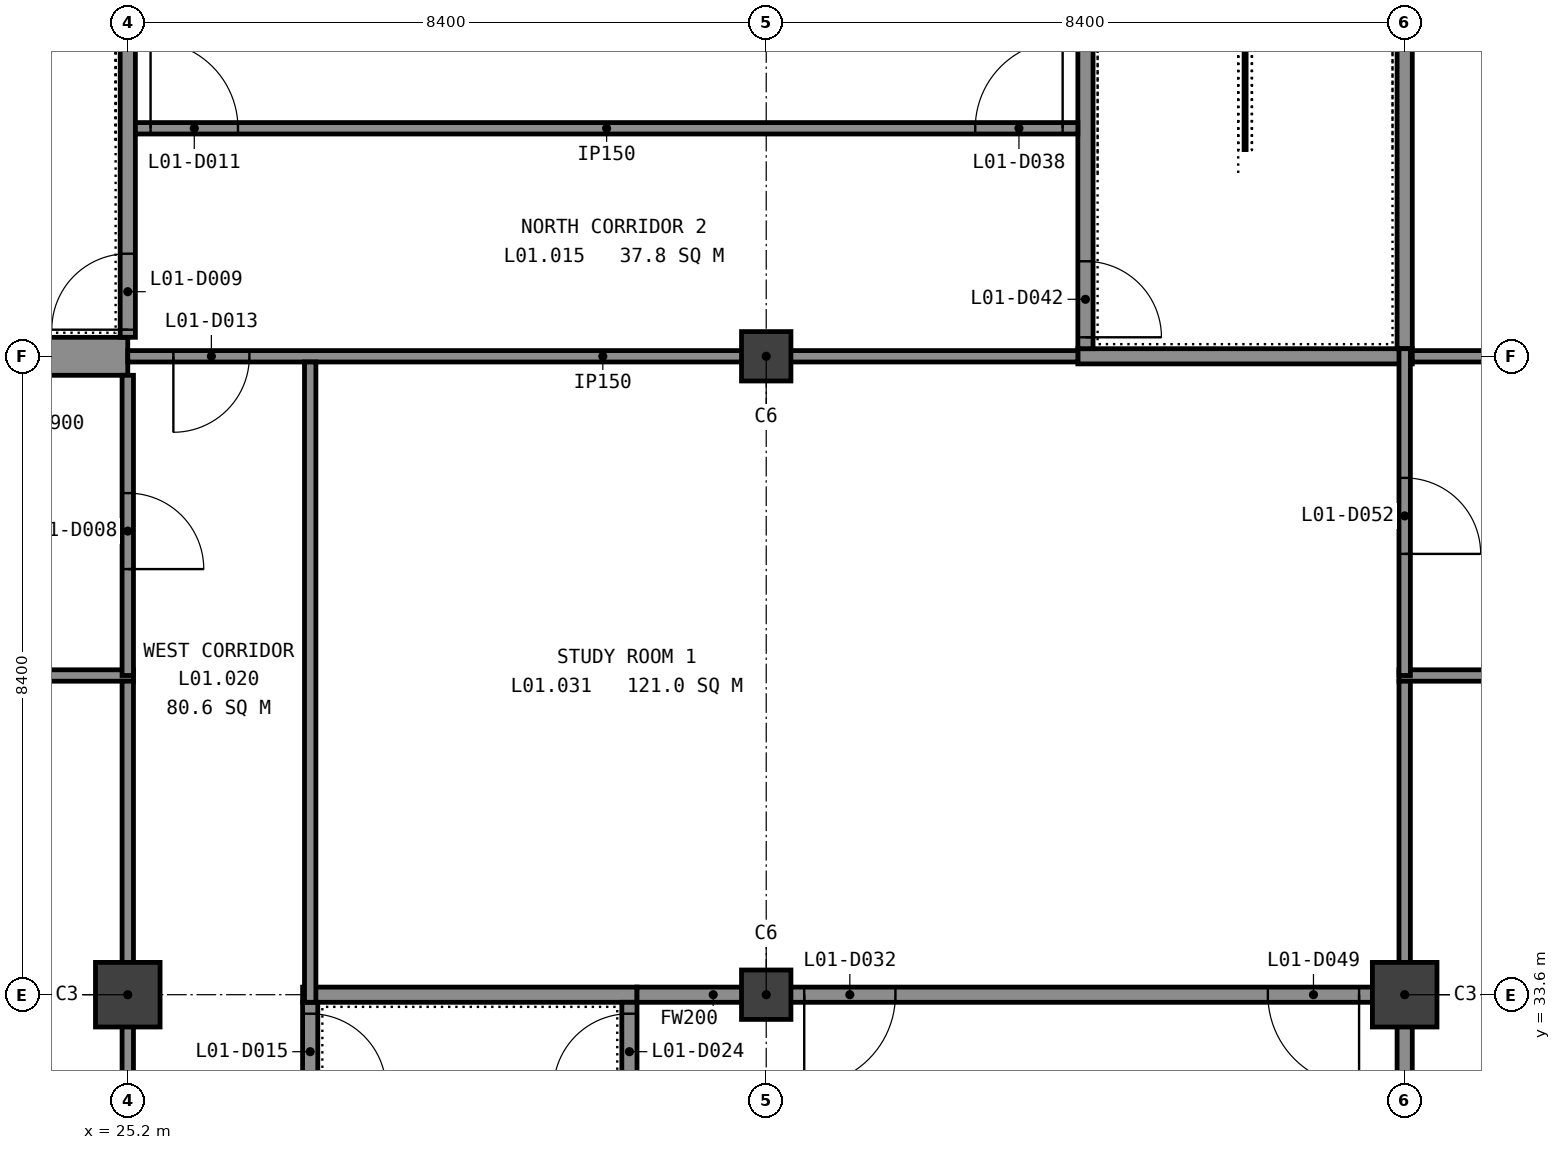
"""IFC4 building model, lengths in metres.
Left out: names, types, materials, properties, quantities, classifications, styles, units other than length and angle.
Written with IfcOpenShell. Run it as: python <this file> out.ifc"""

import sys

from ifc_helpers import new_model, si_unit, direction, frame, frame_2d, origin, origin_2d, place, context, subcontext, project, spatial, rectangle, extrude, element, fill, save


model = new_model("IFC4")
c1 = context("Model", 3, precision=1e-05, world=origin(), true_north=direction((0.0, 1.0)))
c2 = subcontext(c1, "Body", "Model", "MODEL_VIEW")
j1 = project(units=[si_unit("LENGTHUNIT", "METRE"), si_unit("PLANEANGLEUNIT", "RADIAN")], contexts=[c1])
p1 = place(None, origin())
s1 = spatial("IfcSite", under=j1, at=p1, CompositionType="ELEMENT")
p2 = place(p1, origin())
s2 = spatial("IfcBuilding", under=s1, at=p2, CompositionType="ELEMENT")
p3 = place(p2, frame((0.0, 0.0, 5.4)))
s3 = spatial("IfcBuildingStorey", under=s2, at=p3, CompositionType="ELEMENT", Elevation=5.4)
p4 = place(p3, frame((25.2, 33.6, -0.3), z_axis=(0.0, 0.0, 1.0), x_axis=(1.0, 0.0, 0.0)))
e1 = element("IfcColumn", 1, at=p4, inside=s3, PredefinedType="COLUMN", context=c2, shape_type="SweptSolid", body=[
    extrude(rectangle(XDim=0.85, YDim=0.85, at=origin_2d()), origin(), (0.0, 0.0, 1.0), 4.55),
])
for number, where, z_axis, x_axis in (
    (2, (33.6, 33.6, -0.3), (0.0, 0.0, 1.0), (1.0, 0.0, 0.0)),
    (3, (33.6, 42.0, -0.3), (0.0, 0.0, 1.0), (1.0, 0.0, 0.0)),
):
    element("IfcColumn", number, at=place(p3, frame(where, z_axis=z_axis, x_axis=x_axis)), inside=s3, PredefinedType="COLUMN", context=c2, shape_type="SweptSolid", body=[
        extrude(rectangle(XDim=0.65, YDim=0.65, at=origin_2d()), origin(), (0.0, 0.0, 1.0), 4.55),
    ])
p5 = place(p3, frame((42.0, 33.6, -0.3), z_axis=(0.0, 0.0, 1.0), x_axis=(1.0, 0.0, 0.0)))
e4 = element("IfcColumn", 4, at=p5, inside=s3, PredefinedType="COLUMN", context=c2, shape_type="SweptSolid", body=[
    extrude(rectangle(XDim=0.85, YDim=0.85, at=origin_2d()), origin(), (0.0, 0.0, 1.0), 4.55),
])
p6 = place(p3, frame((0.0, 42.0, -0.3), z_axis=(0.0, 0.0, 1.0), x_axis=(1.0, 0.0, 0.0)))
e5 = element("IfcWall", 5, at=p6, inside=s3, PredefinedType="SHEAR", context=c2, shape_type="SweptSolid", body=[
    extrude(rectangle(XDim=25.2, YDim=0.5, at=frame_2d((12.6, 0.0))), origin(), (0.0, 0.0, 1.0), 4.55),
])
p7 = place(p6, frame((22.05, 0.0, 0.3)))
e6 = element("IfcOpeningElement", 6, at=p7, cuts=e5, PredefinedType="OPENING", context=c2, shape_type="SweptSolid", body=[
    extrude(rectangle(XDim=2.1, YDim=2.1, at=frame_2d((1.05, 1.05))), frame((0.0, 0.26, 0.0), z_axis=(0.0, -1.0, 0.0), x_axis=(1.0, 0.0, 0.0)), (0.0, 0.0, 1.0), 0.52),
])
p8 = place(p6, frame((10.0, 0.0, 0.3)))
e7 = element("IfcOpeningElement", 7, at=p8, cuts=e5, PredefinedType="OPENING", context=c2, shape_type="SweptSolid", body=[
    extrude(rectangle(XDim=1.0, YDim=2.1, at=frame_2d((0.5, 1.05))), frame((0.0, 0.26, 0.0), z_axis=(0.0, -1.0, 0.0), x_axis=(1.0, 0.0, 0.0)), (0.0, 0.0, 1.0), 0.52),
])
p9 = place(p3, frame((25.2, 42.25, -0.3), z_axis=(0.0, 0.0, 1.0), x_axis=(0.0, 1.0, 0.0)))
e8 = element("IfcWall", 8, at=p9, inside=s3, PredefinedType="SHEAR", context=c2, shape_type="SweptSolid", body=[
    extrude(rectangle(XDim=7.775, YDim=0.2, at=frame_2d((3.887, 0.0))), origin(), (0.0, 0.0, 1.0), 4.5),
])
p10 = place(p9, frame((0.1, 0.0, 0.3)))
e9 = element("IfcOpeningElement", 9, at=p10, cuts=e8, PredefinedType="OPENING", context=c2, shape_type="SweptSolid", body=[
    extrude(rectangle(XDim=1.0, YDim=2.1, at=frame_2d((0.5, 1.05))), frame((0.0, 0.11, 0.0), z_axis=(0.0, -1.0, 0.0), x_axis=(1.0, 0.0, 0.0)), (0.0, 0.0, 1.0), 0.22),
])
p11 = place(p3, frame((27.5, 33.6, -0.3), z_axis=(0.0, 0.0, 1.0), x_axis=(1.0, 0.0, 0.0)))
e10 = element("IfcWall", 10, at=p11, inside=s3, PredefinedType="SHEAR", context=c2, shape_type="SweptSolid", body=[
    extrude(rectangle(XDim=4.4, YDim=0.2, at=frame_2d((2.2, 0.0))), origin(), (0.0, 0.0, 1.0), 4.5),
])
p12 = place(p3, frame((27.6, 25.3, -0.3), z_axis=(0.0, 0.0, 1.0), x_axis=(0.0, 1.0, 0.0)))
e11 = element("IfcWall", 11, at=p12, inside=s3, PredefinedType="SHEAR", context=c2, shape_type="SweptSolid", body=[
    extrude(rectangle(XDim=8.2, YDim=0.2, at=frame_2d((4.1, 0.0))), origin(), (0.0, 0.0, 1.0), 4.5),
])
p13 = place(p12, frame((7.05, 0.0, 0.3)))
e12 = element("IfcOpeningElement", 12, at=p13, cuts=e11, PredefinedType="OPENING", context=c2, shape_type="SweptSolid", body=[
    extrude(rectangle(XDim=1.0, YDim=2.1, at=frame_2d((0.5, 1.05))), frame((0.0, 0.11, 0.0), z_axis=(0.0, -1.0, 0.0), x_axis=(1.0, 0.0, 0.0)), (0.0, 0.0, 1.0), 0.22),
])
p14 = place(p3, frame((31.8, 25.3, -0.3), z_axis=(0.0, 0.0, 1.0), x_axis=(0.0, 1.0, 0.0)))
e13 = element("IfcWall", 13, at=p14, inside=s3, PredefinedType="SHEAR", context=c2, shape_type="SweptSolid", body=[
    extrude(rectangle(XDim=8.2, YDim=0.2, at=frame_2d((4.1, 0.0))), origin(), (0.0, 0.0, 1.0), 4.5),
])
p15 = place(p14, frame((7.05, 0.0, 0.3)))
e14 = element("IfcOpeningElement", 14, at=p15, cuts=e13, PredefinedType="OPENING", context=c2, shape_type="SweptSolid", body=[
    extrude(rectangle(XDim=1.0, YDim=2.1, at=frame_2d((0.5, 1.05))), frame((0.0, 0.11, 0.0), z_axis=(0.0, -1.0, 0.0), x_axis=(1.0, 0.0, 0.0)), (0.0, 0.0, 1.0), 0.22),
])
p16 = place(p3, frame((37.7, 42.0, -0.3), z_axis=(0.0, 0.0, 1.0), x_axis=(1.0, 0.0, 0.0)))
e15 = element("IfcWall", 15, at=p16, inside=s3, PredefinedType="SHEAR", context=c2, shape_type="SweptSolid", body=[
    extrude(rectangle(XDim=4.4, YDim=0.2, at=frame_2d((2.2, 0.0))), origin(), (0.0, 0.0, 1.0), 4.5),
])
p17 = place(p3, frame((37.8, 42.1, -0.3), z_axis=(0.0, 0.0, 1.0), x_axis=(0.0, 1.0, 0.0)))
e16 = element("IfcWall", 16, at=p17, inside=s3, PredefinedType="SHEAR", context=c2, shape_type="SweptSolid", body=[
    extrude(rectangle(XDim=7.925, YDim=0.2, at=frame_2d((3.962, 0.0))), origin(), (0.0, 0.0, 1.0), 4.5),
])
p18 = place(p17, frame((0.15, 0.0, 0.3)))
e17 = element("IfcOpeningElement", 17, at=p18, cuts=e16, PredefinedType="OPENING", context=c2, shape_type="SweptSolid", body=[
    extrude(rectangle(XDim=1.0, YDim=2.1, at=frame_2d((0.5, 1.05))), frame((0.0, 0.11, 0.0), z_axis=(0.0, -1.0, 0.0), x_axis=(1.0, 0.0, 0.0)), (0.0, 0.0, 1.0), 0.22),
])
p19 = place(p3, frame((42.0, 42.1, -0.3), z_axis=(0.0, 0.0, 1.0), x_axis=(0.0, 1.0, 0.0)))
e18 = element("IfcWall", 18, at=p19, inside=s3, PredefinedType="SHEAR", context=c2, shape_type="SweptSolid", body=[
    extrude(rectangle(XDim=7.925, YDim=0.2, at=frame_2d((3.962, 0.0))), origin(), (0.0, 0.0, 1.0), 4.5),
])
p20 = place(p3, frame((0.0, 37.8, -0.3), z_axis=(0.0, 0.0, 1.0), x_axis=(1.0, 0.0, 0.0)))
e19 = element("IfcWall", 19, at=p20, inside=s3, PredefinedType="PARTITIONING", context=c2, shape_type="SweptSolid", body=[
    extrude(rectangle(XDim=25.275, YDim=0.15, at=frame_2d((12.637, 0.0))), origin(), (0.0, 0.0, 1.0), 4.5),
])
p21 = place(p3, frame((41.925, 37.8, -0.3), z_axis=(0.0, 0.0, 1.0), x_axis=(1.0, 0.0, 0.0)))
e20 = element("IfcWall", 20, at=p21, inside=s3, PredefinedType="PARTITIONING", context=c2, shape_type="SweptSolid", body=[
    extrude(rectangle(XDim=42.15, YDim=0.15, at=frame_2d((21.075, 0.0))), origin(), (0.0, 0.0, 1.0), 4.5),
])
p22 = place(p3, frame((42.1, 42.0, -0.3), z_axis=(0.0, 0.0, 1.0), x_axis=(1.0, 0.0, 0.0)))
e21 = element("IfcWall", 21, at=p22, inside=s3, PredefinedType="PARTITIONING", context=c2, shape_type="SweptSolid", body=[
    extrude(rectangle(XDim=41.9, YDim=0.15, at=frame_2d((20.95, 0.0))), origin(), (0.0, 0.0, 1.0), 4.5),
])
p23 = place(p3, frame((25.2, 8.65, -0.3), z_axis=(0.0, 0.0, 1.0), x_axis=(0.0, 1.0, 0.0)))
e22 = element("IfcWall", 22, at=p23, inside=s3, PredefinedType="PARTITIONING", context=c2, shape_type="SweptSolid", body=[
    extrude(rectangle(XDim=29.075, YDim=0.15, at=frame_2d((14.538, 0.0))), origin(), (0.0, 0.0, 1.0), 3.9),
])
p24 = place(p3, frame((42.0, 25.3, -0.3), z_axis=(0.0, 0.0, 1.0), x_axis=(0.0, 1.0, 0.0)))
e23 = element("IfcWall", 23, at=p24, inside=s3, PredefinedType="SOLIDWALL", context=c2, shape_type="SweptSolid", body=[
    extrude(rectangle(XDim=8.2, YDim=0.2, at=frame_2d((4.1, 0.0))), origin(), (0.0, 0.0, 1.0), 3.9),
])
p25 = place(p3, frame((42.0, 33.7, -0.3), z_axis=(0.0, 0.0, 1.0), x_axis=(0.0, 1.0, 0.0)))
e24 = element("IfcWall", 24, at=p25, inside=s3, PredefinedType="PARTITIONING", context=c2, shape_type="SweptSolid", body=[
    extrude(rectangle(XDim=4.025, YDim=0.15, at=frame_2d((2.013, 0.0))), origin(), (0.0, 0.0, 1.0), 4.5),
])
p26 = place(p3, frame((31.9, 33.6, 0.0), z_axis=(0.0, 0.0, 1.0), x_axis=(1.0, 0.0, 0.0)))
e25 = element("IfcWall", 25, at=p26, inside=s3, PredefinedType="SOLIDWALL", context=c2, shape_type="SweptSolid", body=[
    extrude(rectangle(XDim=2.005, YDim=0.2, at=frame_2d((1.002, 0.0))), origin(), (0.0, 0.0, 1.0), 4.2),
])
p27 = place(p3, frame((33.905, 33.6, 0.0), z_axis=(0.0, 0.0, 1.0), x_axis=(1.0, 0.0, 0.0)))
e26 = element("IfcWall", 26, at=p27, inside=s3, PredefinedType="SOLIDWALL", context=c2, shape_type="SweptSolid", body=[
    extrude(rectangle(XDim=8.095, YDim=0.2, at=frame_2d((4.047, 0.0))), origin(), (0.0, 0.0, 1.0), 3.5),
])
p28 = place(p27, frame((0.195, 0.0, 0.0)))
e27 = element("IfcOpeningElement", 27, at=p28, cuts=e26, PredefinedType="OPENING", context=c2, shape_type="SweptSolid", body=[
    extrude(rectangle(XDim=1.2, YDim=2.1, at=frame_2d((0.6, 1.05))), frame((0.0, 0.11, 0.0), z_axis=(0.0, -1.0, 0.0), x_axis=(1.0, 0.0, 0.0)), (0.0, 0.0, 1.0), 0.22),
])
p29 = place(p27, frame((6.295, 0.0, 0.0)))
e28 = element("IfcOpeningElement", 28, at=p29, cuts=e26, PredefinedType="OPENING", context=c2, shape_type="SweptSolid", body=[
    extrude(rectangle(XDim=1.2, YDim=2.1, at=frame_2d((0.6, 1.05))), frame((0.0, 0.11, 0.0), z_axis=(0.0, -1.0, 0.0), x_axis=(1.0, 0.0, 0.0)), (0.0, 0.0, 1.0), 0.22),
])
p30 = place(p3, frame((25.2, 42.0, 0.0), z_axis=(0.0, 0.0, 1.0), x_axis=(1.0, 0.0, 0.0)))
e29 = element("IfcWall", 29, at=p30, inside=s3, PredefinedType="PARTITIONING", context=c2, shape_type="SweptSolid", body=[
    extrude(rectangle(XDim=12.5, YDim=0.15, at=frame_2d((6.25, 0.0))), origin(), (0.0, 0.0, 1.0), 4.2),
])
p31 = place(p30, frame((0.6, 0.0, 0.0)))
e30 = element("IfcOpeningElement", 30, at=p31, cuts=e29, PredefinedType="OPENING", context=c2, shape_type="SweptSolid", body=[
    extrude(rectangle(XDim=1.0, YDim=2.1, at=frame_2d((0.5, 1.05))), frame((0.0, 0.085, 0.0), z_axis=(0.0, -1.0, 0.0), x_axis=(1.0, 0.0, 0.0)), (0.0, 0.0, 1.0), 0.17),
])
p32 = place(p3, frame((25.3, 45.0, 0.0), z_axis=(0.0, 0.0, 1.0), x_axis=(1.0, 0.0, 0.0)))
e31 = element("IfcWall", 31, at=p32, inside=s3, PredefinedType="PARTITIONING", context=c2, shape_type="SweptSolid", body=[
    extrude(rectangle(XDim=12.4, YDim=0.15, at=frame_2d((6.2, 0.0))), origin(), (0.0, 0.0, 1.0), 4.2),
])
p33 = place(p32, frame((0.2, 0.0, 0.0)))
e32 = element("IfcOpeningElement", 32, at=p33, cuts=e31, PredefinedType="OPENING", context=c2, shape_type="SweptSolid", body=[
    extrude(rectangle(XDim=1.15, YDim=2.1, at=frame_2d((0.575, 1.05))), frame((0.0, 0.085, 0.0), z_axis=(0.0, -1.0, 0.0), x_axis=(1.0, 0.0, 0.0)), (0.0, 0.0, 1.0), 0.17),
])
p34 = place(p32, frame((11.05, 0.0, 0.0)))
e33 = element("IfcOpeningElement", 33, at=p34, cuts=e31, PredefinedType="OPENING", context=c2, shape_type="SweptSolid", body=[
    extrude(rectangle(XDim=1.15, YDim=2.1, at=frame_2d((0.575, 1.05))), frame((0.0, 0.085, 0.0), z_axis=(0.0, -1.0, 0.0), x_axis=(1.0, 0.0, 0.0)), (0.0, 0.0, 1.0), 0.17),
])
p35 = place(p3, frame((25.2, 37.8, 0.0), z_axis=(0.0, 0.0, 1.0), x_axis=(0.0, 1.0, 0.0)))
e34 = element("IfcWall", 34, at=p35, inside=s3, PredefinedType="PARTITIONING", context=c2, shape_type="SweptSolid", body=[
    extrude(rectangle(XDim=3.95, YDim=0.15, at=frame_2d((1.975, 0.0))), origin(), (0.0, 0.0, 1.0), 3.6),
])
p36 = place(p35, frame((1.4, 0.0, 0.0)))
e35 = element("IfcOpeningElement", 35, at=p36, cuts=e34, PredefinedType="OPENING", context=c2, shape_type="SweptSolid", body=[
    extrude(rectangle(XDim=1.0, YDim=2.1, at=frame_2d((0.5, 1.05))), frame((0.0, 0.085, 0.0), z_axis=(0.0, -1.0, 0.0), x_axis=(1.0, 0.0, 0.0)), (0.0, 0.0, 1.0), 0.17),
])
p37 = place(p3, frame((27.6, 33.5, 0.0), z_axis=(0.0, 0.0, 1.0), x_axis=(0.0, 1.0, 0.0)))
e36 = element("IfcWall", 36, at=p37, inside=s3, PredefinedType="PARTITIONING", context=c2, shape_type="SweptSolid", body=[
    extrude(rectangle(XDim=8.425, YDim=0.15, at=frame_2d((4.212, 0.0))), origin(), (0.0, 0.0, 1.0), 4.2),
])
p38 = place(p3, frame((42.0, 37.8, 0.0), z_axis=(0.0, 0.0, 1.0), x_axis=(0.0, 1.0, 0.0)))
e37 = element("IfcWall", 37, at=p38, inside=s3, PredefinedType="PARTITIONING", context=c2, shape_type="SweptSolid", body=[
    extrude(rectangle(XDim=4.3, YDim=0.15, at=frame_2d((2.15, 0.0))), origin(), (0.0, 0.0, 1.0), 8.7),
])
p39 = place(p38, frame((1.6, 0.0, 0.0)))
e38 = element("IfcOpeningElement", 38, at=p39, cuts=e37, PredefinedType="OPENING", context=c2, shape_type="SweptSolid", body=[
    extrude(rectangle(XDim=1.0, YDim=2.1, at=frame_2d((0.5, 1.05))), frame((0.0, 0.085, 0.0), z_axis=(0.0, -1.0, 0.0), x_axis=(1.0, 0.0, 0.0)), (0.0, 0.0, 1.0), 0.17),
])
p40 = place(p10, origin())
e39 = element("IfcDoor", 39, at=p40, inside=s3, OperationType="SINGLE_SWING_RIGHT", PredefinedType="DOOR", context=c2, shape_type="SweptSolid", body=[
    extrude(rectangle(XDim=1.0, YDim=2.1, at=frame_2d((0.5, 1.05))), frame((0.0, 0.025, 0.0), z_axis=(0.0, -1.0, 0.0), x_axis=(1.0, 0.0, 0.0)), (0.0, 0.0, 1.0), 0.05),
])
fill(e9, e39)
p41 = place(p13, origin())
e40 = element("IfcDoor", 40, at=p41, inside=s3, OperationType="SINGLE_SWING_LEFT", PredefinedType="DOOR", context=c2, shape_type="SweptSolid", body=[
    extrude(rectangle(XDim=1.0, YDim=2.1, at=frame_2d((0.5, 1.05))), frame((0.0, 0.025, 0.0), z_axis=(0.0, -1.0, 0.0), x_axis=(1.0, 0.0, 0.0)), (0.0, 0.0, 1.0), 0.05),
])
fill(e12, e40)
p42 = place(p15, origin())
e41 = element("IfcDoor", 41, at=p42, inside=s3, OperationType="SINGLE_SWING_RIGHT", PredefinedType="DOOR", context=c2, shape_type="SweptSolid", body=[
    extrude(rectangle(XDim=1.0, YDim=2.1, at=frame_2d((0.5, 1.05))), frame((0.0, 0.025, 0.0), z_axis=(0.0, -1.0, 0.0), x_axis=(1.0, 0.0, 0.0)), (0.0, 0.0, 1.0), 0.05),
])
fill(e14, e41)
p43 = place(p18, origin())
e42 = element("IfcDoor", 42, at=p43, inside=s3, OperationType="SINGLE_SWING_LEFT", PredefinedType="DOOR", context=c2, shape_type="SweptSolid", body=[
    extrude(rectangle(XDim=1.0, YDim=2.1, at=frame_2d((0.5, 1.05))), frame((0.0, 0.025, 0.0), z_axis=(0.0, -1.0, 0.0), x_axis=(1.0, 0.0, 0.0)), (0.0, 0.0, 1.0), 0.05),
])
fill(e17, e42)
p44 = place(p28, origin())
e43 = element("IfcDoor", 43, at=p44, inside=s3, OperationType="SINGLE_SWING_LEFT", PredefinedType="DOOR", context=c2, shape_type="SweptSolid", body=[
    extrude(rectangle(XDim=1.2, YDim=2.1, at=frame_2d((0.6, 1.05))), frame((0.0, 0.025, 0.0), z_axis=(0.0, -1.0, 0.0), x_axis=(1.0, 0.0, 0.0)), (0.0, 0.0, 1.0), 0.05),
])
fill(e27, e43)
p45 = place(p29, origin())
e44 = element("IfcDoor", 44, at=p45, inside=s3, OperationType="SINGLE_SWING_RIGHT", PredefinedType="DOOR", context=c2, shape_type="SweptSolid", body=[
    extrude(rectangle(XDim=1.2, YDim=2.1, at=frame_2d((0.6, 1.05))), frame((0.0, 0.025, 0.0), z_axis=(0.0, -1.0, 0.0), x_axis=(1.0, 0.0, 0.0)), (0.0, 0.0, 1.0), 0.05),
])
fill(e28, e44)
p46 = place(p33, origin())
e45 = element("IfcDoor", 45, at=p46, inside=s3, OperationType="SINGLE_SWING_RIGHT", PredefinedType="DOOR", context=c2, shape_type="SweptSolid", body=[
    extrude(rectangle(XDim=1.15, YDim=2.1, at=frame_2d((0.575, 1.05))), frame((0.0, 0.025, 0.0), z_axis=(0.0, -1.0, 0.0), x_axis=(1.0, 0.0, 0.0)), (0.0, 0.0, 1.0), 0.05),
])
fill(e32, e45)
p47 = place(p34, origin())
e46 = element("IfcDoor", 46, at=p47, inside=s3, OperationType="SINGLE_SWING_LEFT", PredefinedType="DOOR", context=c2, shape_type="SweptSolid", body=[
    extrude(rectangle(XDim=1.15, YDim=2.1, at=frame_2d((0.575, 1.05))), frame((0.0, 0.025, 0.0), z_axis=(0.0, -1.0, 0.0), x_axis=(1.0, 0.0, 0.0)), (0.0, 0.0, 1.0), 0.05),
])
fill(e33, e46)
p48 = place(p39, origin())
e47 = element("IfcDoor", 47, at=p48, inside=s3, OperationType="SINGLE_SWING_LEFT", PredefinedType="DOOR", context=c2, shape_type="SweptSolid", body=[
    extrude(rectangle(XDim=1.0, YDim=2.1, at=frame_2d((0.5, 1.05))), frame((0.0, 0.025, 0.0), z_axis=(0.0, -1.0, 0.0), x_axis=(1.0, 0.0, 0.0)), (0.0, 0.0, 1.0), 0.05),
])
fill(e38, e47)
p49 = place(p36, origin())
e48 = element("IfcDoor", 48, at=p49, inside=s3, OperationType="SINGLE_SWING_LEFT", PredefinedType="DOOR", context=c2, shape_type="SweptSolid", body=[
    extrude(rectangle(XDim=1.0, YDim=2.1, at=frame_2d((0.5, 1.05))), frame((0.0, 0.025, 0.0), z_axis=(0.0, -1.0, 0.0), x_axis=(1.0, 0.0, 0.0)), (0.0, 0.0, 1.0), 0.05),
])
fill(e35, e48)
p50 = place(p31, origin())
e49 = element("IfcDoor", 49, at=p50, inside=s3, OperationType="SINGLE_SWING_LEFT", PredefinedType="DOOR", context=c2, shape_type="SweptSolid", body=[
    extrude(rectangle(XDim=1.0, YDim=2.1, at=frame_2d((0.5, 1.05))), frame((0.0, 0.025, 0.0), z_axis=(0.0, -1.0, 0.0), x_axis=(1.0, 0.0, 0.0)), (0.0, 0.0, 1.0), 0.05),
])
fill(e30, e49)
save(model, sys.argv[1])
